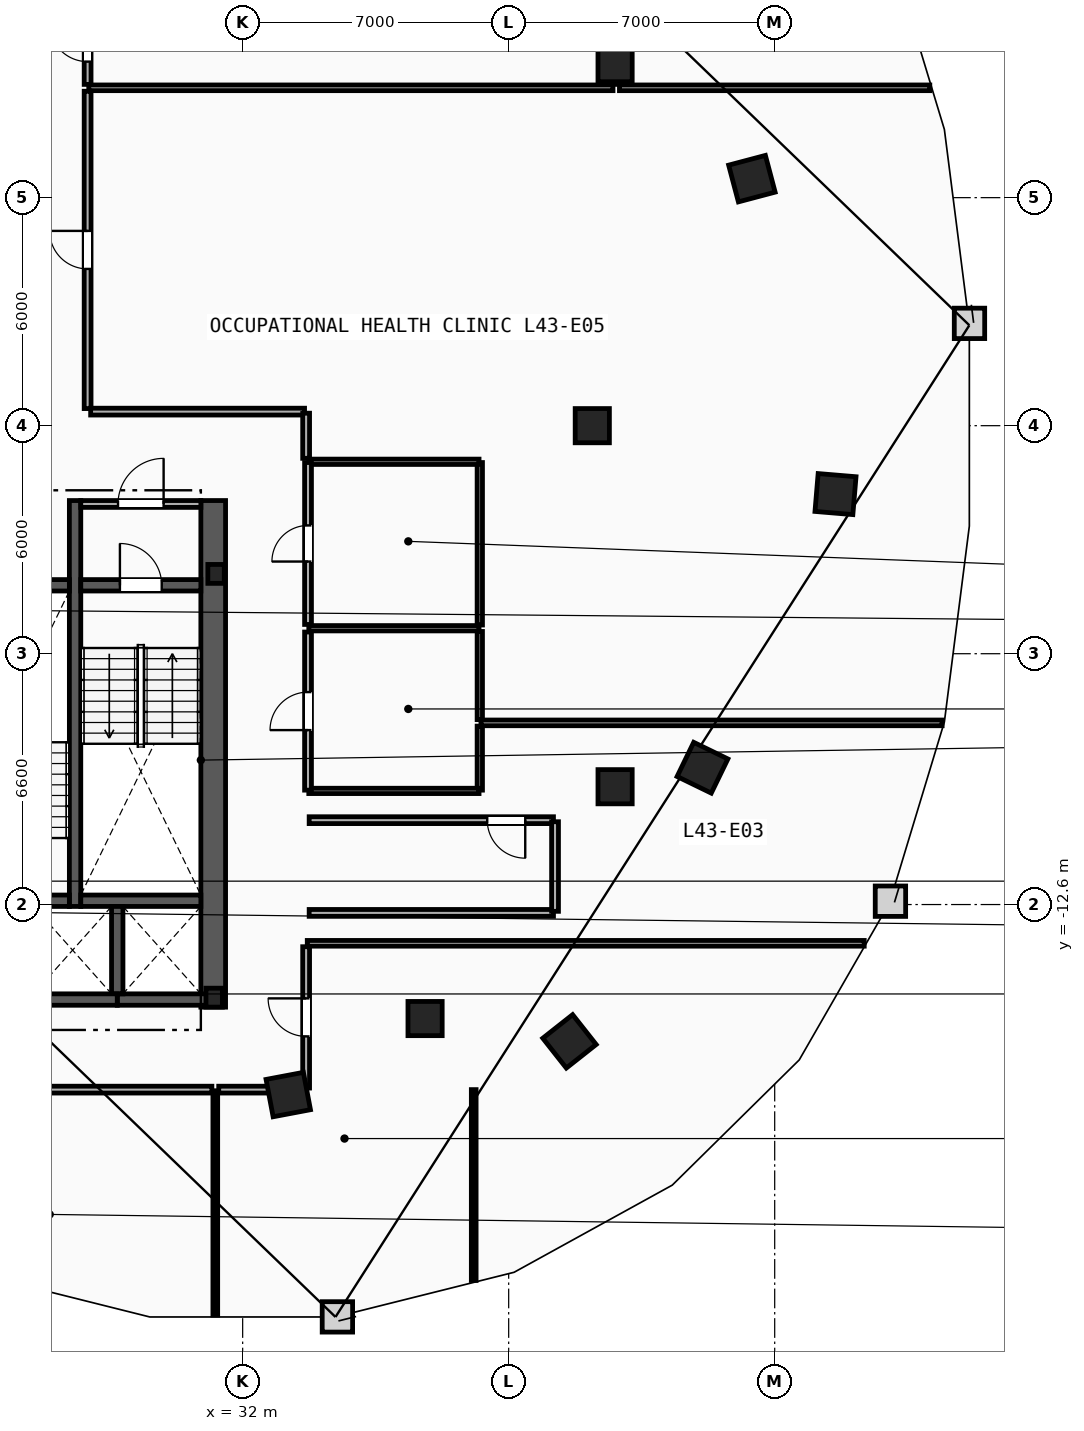
"""IFC4 building model, lengths in metres.
Left out: names, types, materials, properties, quantities, classifications, styles, units other than length and angle.
Written with IfcOpenShell. Run it as: python <this file> out.ifc"""

import sys

from ifc_helpers import new_model, si_unit, direction, frame, frame_2d, origin, origin_2d, place, context, subcontext, project, spatial, rectangle, i_section, extrude, element, fill, save


model = new_model("IFC4")
c1 = context("Model", 3, precision=1e-05, world=origin(), true_north=direction((0.0, 1.0)))
c2 = subcontext(c1, "Body", "Model", "MODEL_VIEW")
j1 = project(units=[si_unit("LENGTHUNIT", "METRE"), si_unit("PLANEANGLEUNIT", "RADIAN")], contexts=[c1])
p1 = place(None, origin())
s1 = spatial("IfcSite", under=j1, at=p1, CompositionType="ELEMENT")
p2 = place(p1, origin())
s2 = spatial("IfcBuilding", under=s1, at=p2, CompositionType="ELEMENT")
p3 = place(p2, frame((0.0, 0.0, 165.6)))
s3 = spatial("IfcBuildingStorey", under=s2, at=p3, CompositionType="ELEMENT", Elevation=165.6)
for number, where, z_axis, x_axis in (
    (1, (31.3, -3.9, 0.0), (0.0, 0.0, 1.0), (1.0, 0.0, 0.0)),
    (2, (31.25, -15.05, 0.0), (0.0, 0.0, 1.0), (1.0, 0.0, 0.0)),
):
    element("IfcColumn", number, at=place(p3, frame(where, z_axis=z_axis, x_axis=x_axis)), inside=s3, PredefinedType="COLUMN", context=c2, shape_type="SweptSolid", body=[
        extrude(i_section(OverallWidth=0.432, OverallDepth=0.498, WebThickness=0.056, FlangeThickness=0.089, FilletRadius=0.018, at=origin_2d()), origin(), (0.0, 0.0, 1.0), 3.6),
    ])
for number, where, z_axis, x_axis in (
    (3, (41.2, 0.0, 0.0), (0.0, 0.0, 1.0), (1.0, 0.0, 0.0)),
    (4, (41.8, -9.5, 0.0), (0.0, 0.0, 1.0), (1.0, 0.0, 0.0)),
    (5, (36.8, -15.6, 0.0), (0.0, 0.0, 1.0), (1.0, 0.0, 0.0)),
    (6, (41.8, 9.5, 0.0), (0.0, 0.0, 1.0), (1.0, 0.0, 0.0)),
):
    element("IfcColumn", number, at=place(p3, frame(where, z_axis=z_axis, x_axis=x_axis)), inside=s3, PredefinedType="COLUMN", context=c2, shape_type="SweptSolid", body=[
        extrude(rectangle(XDim=0.9, YDim=0.9, at=origin_2d()), origin(), (0.0, 0.0, 1.0), 3.6),
    ])
for number, where, z_axis, x_axis in (
    (7, (33.2, -17.6, 0.0), (0.0, 0.0, 1.0), (0.983, 0.186, 0.0)),
    (8, (40.6, -16.2, 0.0), (0.0, 0.0, 1.0), (0.785, 0.619, 0.0)),
    (9, (44.1, -9.0, 0.0), (0.0, 0.0, 1.0), (0.437, 0.899, 0.0)),
    (10, (47.6, -1.8, 0.0), (0.0, 0.0, 1.0), (0.084, 0.997, 0.0)),
    (11, (45.4, 6.5, 0.0), (0.0, 0.0, 1.0), (-0.256, 0.967, 0.0)),
):
    element("IfcColumn", number, at=place(p3, frame(where, z_axis=z_axis, x_axis=x_axis)), inside=s3, PredefinedType="COLUMN", context=c2, shape_type="SweptSolid", body=[
        extrude(rectangle(XDim=1.0, YDim=1.0, at=origin_2d()), origin(), (0.0, 0.0, 1.0), 3.6),
    ])
p4 = place(p3, frame((31.225, -15.3, 0.0), z_axis=(0.0, 0.0, 1.0), x_axis=(0.0, 1.0, 0.0)))
e12 = element("IfcWall", 12, at=p4, inside=s3, PredefinedType="SHEAR", context=c2, shape_type="SweptSolid", body=[
    extrude(rectangle(XDim=13.33, YDim=0.65, at=frame_2d((6.665, 0.0))), origin(), (0.0, 0.0, 1.0), 3.36),
])
p5 = place(p3, frame((27.59, -12.65, 0.0), z_axis=(0.0, 0.0, 1.0), x_axis=(0.0, 1.0, 0.0)))
e13 = element("IfcWall", 13, at=p5, inside=s3, PredefinedType="SHEAR", context=c2, shape_type="SweptSolid", body=[
    extrude(rectangle(XDim=10.68, YDim=0.3, at=frame_2d((5.34, 0.0))), origin(), (0.0, 0.0, 1.0), 3.36),
])
p6 = place(p3, frame((27.74, -4.2, 0.0), z_axis=(0.0, 0.0, 1.0), x_axis=(1.0, 0.0, 0.0)))
e14 = element("IfcWall", 14, at=p6, inside=s3, PredefinedType="SHEAR", context=c2, shape_type="SweptSolid", body=[
    extrude(rectangle(XDim=3.16, YDim=0.3, at=frame_2d((1.58, 0.0))), origin(), (0.0, 0.0, 1.0), 3.36),
])
p7 = place(p6, frame((1.03, 0.0, 0.0)))
e15 = element("IfcOpeningElement", 15, at=p7, cuts=e14, PredefinedType="OPENING", context=c2, shape_type="SweptSolid", body=[
    extrude(rectangle(XDim=1.1, YDim=2.15, at=frame_2d((0.55, 1.075))), frame((0.0, 0.16, 0.0), z_axis=(0.0, -1.0, 0.0), x_axis=(1.0, 0.0, 0.0)), (0.0, 0.0, 1.0), 0.32),
])
p8 = place(p3, frame((27.74, -12.5, 0.0), z_axis=(0.0, 0.0, 1.0), x_axis=(1.0, 0.0, 0.0)))
e16 = element("IfcWall", 16, at=p8, inside=s3, PredefinedType="SHEAR", context=c2, shape_type="SweptSolid", body=[
    extrude(rectangle(XDim=3.16, YDim=0.3, at=frame_2d((1.58, 0.0))), origin(), (0.0, 0.0, 1.0), 3.36),
])
p9 = place(p3, frame((24.28, -12.5, 0.0), z_axis=(0.0, 0.0, 1.0), x_axis=(1.0, 0.0, 0.0)))
e17 = element("IfcWall", 17, at=p9, inside=s3, PredefinedType="SHEAR", context=c2, shape_type="SweptSolid", body=[
    extrude(rectangle(XDim=3.16, YDim=0.3, at=frame_2d((1.58, 0.0))), origin(), (0.0, 0.0, 1.0), 3.36),
])
p10 = place(p9, frame((1.03, 0.0, 0.0)))
e18 = element("IfcOpeningElement", 18, at=p10, cuts=e17, PredefinedType="OPENING", context=c2, shape_type="SweptSolid", body=[
    extrude(rectangle(XDim=1.1, YDim=2.15, at=frame_2d((0.55, 1.075))), frame((0.0, 0.16, 0.0), z_axis=(0.0, -1.0, 0.0), x_axis=(1.0, 0.0, 0.0)), (0.0, 0.0, 1.0), 0.32),
])
p11 = place(p3, frame((24.28, -4.2, 0.0), z_axis=(0.0, 0.0, 1.0), x_axis=(1.0, 0.0, 0.0)))
e19 = element("IfcWall", 19, at=p11, inside=s3, PredefinedType="SHEAR", context=c2, shape_type="SweptSolid", body=[
    extrude(rectangle(XDim=3.16, YDim=0.3, at=frame_2d((1.58, 0.0))), origin(), (0.0, 0.0, 1.0), 3.36),
])
p12 = place(p3, frame((27.74, -2.06, 0.0), z_axis=(0.0, 0.0, 1.0), x_axis=(1.0, 0.0, 0.0)))
e20 = element("IfcWall", 20, at=p12, inside=s3, PredefinedType="PARTITIONING", context=c2, shape_type="SweptSolid", body=[
    extrude(rectangle(XDim=3.16, YDim=0.18, at=frame_2d((1.58, 0.0))), origin(), (0.0, 0.0, 1.0), 3.36),
])
p13 = place(p12, frame((0.98, 0.0, 0.0)))
e21 = element("IfcOpeningElement", 21, at=p13, cuts=e20, PredefinedType="OPENING", context=c2, shape_type="SweptSolid", body=[
    extrude(rectangle(XDim=1.2, YDim=2.15, at=frame_2d((0.6, 1.075))), frame((0.0, 0.1, 0.0), z_axis=(0.0, -1.0, 0.0), x_axis=(1.0, 0.0, 0.0)), (0.0, 0.0, 1.0), 0.2),
])
p14 = place(p3, frame((28.7, -15.1, 0.0), z_axis=(0.0, 0.0, 1.0), x_axis=(1.0, 0.0, 0.0)))
e22 = element("IfcWall", 22, at=p14, inside=s3, PredefinedType="SHEAR", context=c2, shape_type="SweptSolid", body=[
    extrude(rectangle(XDim=2.5, YDim=0.3, at=frame_2d((1.25, 0.0))), origin(), (0.0, 0.0, 1.0), 3.36),
])
p15 = place(p3, frame((28.7, -14.95, 0.0), z_axis=(0.0, 0.0, 1.0), x_axis=(0.0, 1.0, 0.0)))
e23 = element("IfcWall", 23, at=p15, inside=s3, PredefinedType="SHEAR", context=c2, shape_type="SweptSolid", body=[
    extrude(rectangle(XDim=2.3, YDim=0.3, at=frame_2d((1.15, 0.0))), origin(), (0.0, 0.0, 1.0), 3.36),
])
p16 = place(p3, frame((26.2, -15.1, 0.0), z_axis=(0.0, 0.0, 1.0), x_axis=(1.0, 0.0, 0.0)))
e24 = element("IfcWall", 24, at=p16, inside=s3, PredefinedType="SHEAR", context=c2, shape_type="SweptSolid", body=[
    extrude(rectangle(XDim=2.5, YDim=0.3, at=frame_2d((1.25, 0.0))), origin(), (0.0, 0.0, 1.0), 3.36),
])
p17 = place(p3, frame((38.24, -9.59, 0.0), z_axis=(0.0, 0.0, 1.0), x_axis=(0.0, 1.0, 0.0)))
e25 = element("IfcWall", 25, at=p17, inside=s3, PredefinedType="PARTITIONING", context=c2, shape_type="SweptSolid", body=[
    extrude(rectangle(XDim=1.685, YDim=0.14, at=frame_2d((0.843, 0.0))), origin(), (0.0, 0.0, 1.0), 3.36),
])
p18 = place(p3, frame((38.24, -7.735, 0.0), z_axis=(0.0, 0.0, 1.0), x_axis=(0.0, 1.0, 0.0)))
e26 = element("IfcWall", 26, at=p18, inside=s3, PredefinedType="PARTITIONING", context=c2, shape_type="SweptSolid", body=[
    extrude(rectangle(XDim=2.32, YDim=0.14, at=frame_2d((1.16, 0.0))), origin(), (0.0, 0.0, 1.0), 3.36),
])
p19 = place(p3, frame((38.24, -5.245, 0.0), z_axis=(0.0, 0.0, 1.0), x_axis=(0.0, 1.0, 0.0)))
e27 = element("IfcWall", 27, at=p19, inside=s3, PredefinedType="PARTITIONING", context=c2, shape_type="SweptSolid", body=[
    extrude(rectangle(XDim=4.275, YDim=0.14, at=frame_2d((2.138, 0.0))), origin(), (0.0, 0.0, 1.0), 3.36),
])
for number, where, z_axis, x_axis in (
    (28, (33.74, -0.95, 0.0), (0.0, 0.0, 1.0), (1.0, 0.0, 0.0)),
    (29, (33.74, -5.33, 0.0), (0.0, 0.0, 1.0), (1.0, 0.0, 0.0)),
    (30, (33.74, -9.61, 0.0), (0.0, 0.0, 1.0), (1.0, 0.0, 0.0)),
):
    element("IfcWall", number, at=place(p3, frame(where, z_axis=z_axis, x_axis=x_axis)), inside=s3, PredefinedType="PARTITIONING", context=c2, shape_type="SweptSolid", body=[
        extrude(rectangle(XDim=4.48, YDim=0.14, at=frame_2d((2.24, 0.0))), origin(), (0.0, 0.0, 1.0), 3.36),
    ])
p20 = place(p3, frame((33.72, -5.23, 0.0), z_axis=(0.0, 0.0, 1.0), x_axis=(0.0, 1.0, 0.0)))
e31 = element("IfcWall", 31, at=p20, inside=s3, PredefinedType="PARTITIONING", context=c2, shape_type="SweptSolid", body=[
    extrude(rectangle(XDim=4.26, YDim=0.18, at=frame_2d((2.13, 0.0))), origin(), (0.0, 0.0, 1.0), 3.36),
])
p21 = place(p20, frame((1.655, 0.0, 0.0)))
e32 = element("IfcOpeningElement", 32, at=p21, cuts=e31, PredefinedType="OPENING", context=c2, shape_type="SweptSolid", body=[
    extrude(rectangle(XDim=0.95, YDim=2.1, at=frame_2d((0.475, 1.05))), frame((0.0, 0.1, 0.0), z_axis=(0.0, -1.0, 0.0), x_axis=(1.0, 0.0, 0.0)), (0.0, 0.0, 1.0), 0.2),
])
p22 = place(p3, frame((33.72, -9.59, 0.0), z_axis=(0.0, 0.0, 1.0), x_axis=(0.0, 1.0, 0.0)))
e33 = element("IfcWall", 33, at=p22, inside=s3, PredefinedType="PARTITIONING", context=c2, shape_type="SweptSolid", body=[
    extrude(rectangle(XDim=4.16, YDim=0.18, at=frame_2d((2.08, 0.0))), origin(), (0.0, 0.0, 1.0), 3.36),
])
p23 = place(p22, frame((1.58, 0.0, 0.0)))
e34 = element("IfcOpeningElement", 34, at=p23, cuts=e33, PredefinedType="OPENING", context=c2, shape_type="SweptSolid", body=[
    extrude(rectangle(XDim=1.0, YDim=2.15, at=frame_2d((0.5, 1.075))), frame((0.0, 0.1, 0.0), z_axis=(0.0, -1.0, 0.0), x_axis=(1.0, 0.0, 0.0)), (0.0, 0.0, 1.0), 0.2),
])
p24 = place(p3, frame((27.95, 8.89, 0.0), z_axis=(0.0, 0.0, 1.0), x_axis=(1.0, 0.0, 0.0)))
e35 = element("IfcWall", 35, at=p24, inside=s3, PredefinedType="PARTITIONING", context=c2, shape_type="SweptSolid", body=[
    extrude(rectangle(XDim=13.795, YDim=0.15, at=frame_2d((6.897, 0.0))), origin(), (0.0, 0.0, 1.0), 3.36),
])
p25 = place(p3, frame((41.915, 8.89, 0.0), z_axis=(0.0, 0.0, 1.0), x_axis=(1.0, 0.0, 0.0)))
e36 = element("IfcWall", 36, at=p25, inside=s3, PredefinedType="PARTITIONING", context=c2, shape_type="SweptSolid", body=[
    extrude(rectangle(XDim=8.167, YDim=0.15, at=frame_2d((4.083, 0.0))), origin(), (0.0, 0.0, 1.0), 3.36),
])
p26 = place(p3, frame((38.27, -7.82, 0.0), z_axis=(0.0, 0.0, 1.0), x_axis=(1.0, 0.0, 0.0)))
e37 = element("IfcWall", 37, at=p26, inside=s3, PredefinedType="PARTITIONING", context=c2, shape_type="SweptSolid", body=[
    extrude(rectangle(XDim=12.136, YDim=0.15, at=frame_2d((6.068, 0.0))), origin(), (0.0, 0.0, 1.0), 3.36),
])
p27 = place(p3, frame((33.7, -13.62, 0.0), z_axis=(0.0, 0.0, 1.0), x_axis=(1.0, 0.0, 0.0)))
e38 = element("IfcWall", 38, at=p27, inside=s3, PredefinedType="PARTITIONING", context=c2, shape_type="SweptSolid", body=[
    extrude(rectangle(XDim=14.656, YDim=0.15, at=frame_2d((7.328, 0.0))), origin(), (0.0, 0.0, 1.0), 3.36),
])
p28 = place(p3, frame((31.28, -23.402, 0.0), z_axis=(0.0, 0.0, 1.0), x_axis=(0.0, 1.0, 0.0)))
e39 = element("IfcWall", 39, at=p28, inside=s3, PredefinedType="PARTITIONING", context=c2, shape_type="SweptSolid", body=[
    extrude(rectangle(XDim=5.902, YDim=0.125, at=frame_2d((2.951, 0.0))), origin(), (0.0, 0.0, 1.0), 3.36),
])
p29 = place(p3, frame((38.08, -22.491, 0.0), z_axis=(0.0, 0.0, 1.0), x_axis=(0.0, 1.0, 0.0)))
e40 = element("IfcWall", 40, at=p29, inside=s3, PredefinedType="PARTITIONING", context=c2, shape_type="SweptSolid", body=[
    extrude(rectangle(XDim=5.021, YDim=0.125, at=frame_2d((2.511, 0.0))), origin(), (0.0, 0.0, 1.0), 3.36),
])
p30 = place(p3, frame((18.342, -17.47, 0.0), z_axis=(0.0, 0.0, 1.0), x_axis=(1.0, 0.0, 0.0)))
e41 = element("IfcWall", 41, at=p30, inside=s3, PredefinedType="PARTITIONING", context=c2, shape_type="SweptSolid", body=[
    extrude(rectangle(XDim=12.848, YDim=0.18, at=frame_2d((6.424, 0.0))), origin(), (0.0, 0.0, 1.0), 3.36),
])
p31 = place(p30, frame((4.183, 0.0, 0.0)))
e42 = element("IfcOpeningElement", 42, at=p31, cuts=e41, PredefinedType="OPENING", context=c2, shape_type="SweptSolid", body=[
    extrude(rectangle(XDim=1.0, YDim=2.15, at=frame_2d((0.5, 1.075))), frame((0.0, 0.1, 0.0), z_axis=(0.0, -1.0, 0.0), x_axis=(1.0, 0.0, 0.0)), (0.0, 0.0, 1.0), 0.2),
])
p32 = place(p3, frame((33.67, -17.428, 0.0), z_axis=(0.0, 0.0, 1.0), x_axis=(0.0, 1.0, 0.0)))
e43 = element("IfcWall", 43, at=p32, inside=s3, PredefinedType="PARTITIONING", context=c2, shape_type="SweptSolid", body=[
    extrude(rectangle(XDim=3.719, YDim=0.18, at=frame_2d((1.859, 0.0))), origin(), (0.0, 0.0, 1.0), 3.36),
])
p33 = place(p32, frame((1.359, 0.0, 0.0)))
e44 = element("IfcOpeningElement", 44, at=p33, cuts=e43, PredefinedType="OPENING", context=c2, shape_type="SweptSolid", body=[
    extrude(rectangle(XDim=1.0, YDim=2.15, at=frame_2d((0.5, 1.075))), frame((0.0, 0.1, 0.0), z_axis=(0.0, -1.0, 0.0), x_axis=(1.0, 0.0, 0.0)), (0.0, 0.0, 1.0), 0.2),
])
p34 = place(p3, frame((31.37, -17.47, 0.0), z_axis=(0.0, 0.0, 1.0), x_axis=(1.0, 0.0, 0.0)))
e45 = element("IfcWall", 45, at=p34, inside=s3, PredefinedType="PARTITIONING", context=c2, shape_type="SweptSolid", body=[
    extrude(rectangle(XDim=2.258, YDim=0.18, at=frame_2d((1.129, 0.0))), origin(), (0.0, 0.0, 1.0), 3.36),
])
p35 = place(p3, frame((33.75, -12.82, 0.0), z_axis=(0.0, 0.0, 1.0), x_axis=(1.0, 0.0, 0.0)))
e46 = element("IfcWall", 46, at=p35, inside=s3, PredefinedType="PARTITIONING", context=c2, shape_type="SweptSolid", body=[
    extrude(rectangle(XDim=6.428, YDim=0.18, at=frame_2d((3.214, 0.0))), origin(), (0.0, 0.0, 1.0), 3.36),
])
p36 = place(p3, frame((40.178, -10.38, 0.0), z_axis=(0.0, 0.0, 1.0), x_axis=(-1.0, 0.0, 0.0)))
e47 = element("IfcWall", 47, at=p36, inside=s3, PredefinedType="PARTITIONING", context=c2, shape_type="SweptSolid", body=[
    extrude(rectangle(XDim=6.428, YDim=0.18, at=frame_2d((3.214, 0.0))), origin(), (0.0, 0.0, 1.0), 3.36),
])
p37 = place(p36, frame((0.743, 0.0, 0.0)))
e48 = element("IfcOpeningElement", 48, at=p37, cuts=e47, PredefinedType="OPENING", context=c2, shape_type="SweptSolid", body=[
    extrude(rectangle(XDim=1.0, YDim=2.15, at=frame_2d((0.5, 1.075))), frame((0.0, 0.1, 0.0), z_axis=(0.0, -1.0, 0.0), x_axis=(1.0, 0.0, 0.0)), (0.0, 0.0, 1.0), 0.2),
])
p38 = place(p3, frame((40.22, -12.779, 0.0), z_axis=(0.0, 0.0, 1.0), x_axis=(0.0, 1.0, 0.0)))
e49 = element("IfcWall", 49, at=p38, inside=s3, PredefinedType="PARTITIONING", context=c2, shape_type="SweptSolid", body=[
    extrude(rectangle(XDim=2.357, YDim=0.18, at=frame_2d((1.179, 0.0))), origin(), (0.0, 0.0, 1.0), 3.36),
])
p39 = place(p3, frame((27.92, 0.45, 0.0), z_axis=(0.0, 0.0, 1.0), x_axis=(0.0, 1.0, 0.0)))
e50 = element("IfcWall", 50, at=p39, inside=s3, PredefinedType="PARTITIONING", context=c2, shape_type="SweptSolid", body=[
    extrude(rectangle(XDim=8.35, YDim=0.18, at=frame_2d((4.175, 0.0))), origin(), (0.0, 0.0, 1.0), 3.36),
])
p40 = place(p39, frame((3.675, 0.0, 0.0)))
e51 = element("IfcOpeningElement", 51, at=p40, cuts=e50, PredefinedType="OPENING", context=c2, shape_type="SweptSolid", body=[
    extrude(rectangle(XDim=1.0, YDim=2.15, at=frame_2d((0.5, 1.075))), frame((0.0, 0.1, 0.0), z_axis=(0.0, -1.0, 0.0), x_axis=(1.0, 0.0, 0.0)), (0.0, 0.0, 1.0), 0.2),
])
p41 = place(p3, frame((33.628, 0.37, 0.0), z_axis=(0.0, 0.0, 1.0), x_axis=(-1.0, 0.0, 0.0)))
e52 = element("IfcWall", 52, at=p41, inside=s3, PredefinedType="PARTITIONING", context=c2, shape_type="SweptSolid", body=[
    extrude(rectangle(XDim=5.628, YDim=0.18, at=frame_2d((2.814, 0.0))), origin(), (0.0, 0.0, 1.0), 3.36),
])
p42 = place(p3, frame((33.67, -0.859, 0.0), z_axis=(0.0, 0.0, 1.0), x_axis=(0.0, 1.0, 0.0)))
e53 = element("IfcWall", 53, at=p42, inside=s3, PredefinedType="PARTITIONING", context=c2, shape_type="SweptSolid", body=[
    extrude(rectangle(XDim=1.187, YDim=0.18, at=frame_2d((0.594, 0.0))), origin(), (0.0, 0.0, 1.0), 3.36),
])
p43 = place(p3, frame((27.92, 8.98, 0.0), z_axis=(0.0, 0.0, 1.0), x_axis=(0.0, 1.0, 0.0)))
e54 = element("IfcWall", 54, at=p43, inside=s3, PredefinedType="PARTITIONING", context=c2, shape_type="SweptSolid", body=[
    extrude(rectangle(XDim=2.198, YDim=0.18, at=frame_2d((1.099, 0.0))), origin(), (0.0, 0.0, 1.0), 3.36),
])
p44 = place(p43, frame((0.599, 0.0, 0.0)))
e55 = element("IfcOpeningElement", 55, at=p44, cuts=e54, PredefinedType="OPENING", context=c2, shape_type="SweptSolid", body=[
    extrude(rectangle(XDim=1.0, YDim=2.15, at=frame_2d((0.5, 1.075))), frame((0.0, 0.1, 0.0), z_axis=(0.0, -1.0, 0.0), x_axis=(1.0, 0.0, 0.0)), (0.0, 0.0, 1.0), 0.2),
])
p45 = place(p3, frame((41.83, 8.98, 0.0), z_axis=(0.0, 0.0, 1.0), x_axis=(0.0, 1.0, 0.0)))
e56 = element("IfcWall", 56, at=p45, inside=s3, PredefinedType="PARTITIONING", context=c2, shape_type="SweptSolid", body=[
    extrude(rectangle(XDim=11.638, YDim=0.125, at=frame_2d((5.819, 0.0))), origin(), (0.0, 0.0, 1.0), 2.897),
])
p46 = place(p45, frame((3.76, 0.0, 0.0)))
e57 = element("IfcOpeningElement", 57, at=p46, cuts=e56, PredefinedType="OPENING", context=c2, shape_type="SweptSolid", body=[
    extrude(rectangle(XDim=1.0, YDim=2.15, at=frame_2d((0.5, 1.075))), frame((0.0, 0.073, 0.0), z_axis=(0.0, -1.0, 0.0), x_axis=(1.0, 0.0, 0.0)), (0.0, 0.0, 1.0), 0.145),
])
p47 = place(p7, origin())
e58 = element("IfcDoor", 58, at=p47, inside=s3, OperationType="SINGLE_SWING_LEFT", PredefinedType="DOOR", context=c2, shape_type="SweptSolid", body=[
    extrude(rectangle(XDim=1.1, YDim=2.15, at=frame_2d((0.55, 1.075))), frame((0.0, 0.025, 0.0), z_axis=(0.0, -1.0, 0.0), x_axis=(1.0, 0.0, 0.0)), (0.0, 0.0, 1.0), 0.05),
])
fill(e15, e58)
p48 = place(p13, origin())
e59 = element("IfcDoor", 59, at=p48, inside=s3, OperationType="SINGLE_SWING_RIGHT", PredefinedType="DOOR", context=c2, shape_type="SweptSolid", body=[
    extrude(rectangle(XDim=1.2, YDim=2.15, at=frame_2d((0.6, 1.075))), frame((0.0, 0.025, 0.0), z_axis=(0.0, -1.0, 0.0), x_axis=(1.0, 0.0, 0.0)), (0.0, 0.0, 1.0), 0.05),
])
fill(e21, e59)
p49 = place(p40, origin())
e60 = element("IfcDoor", 60, at=p49, inside=s3, OperationType="SINGLE_SWING_RIGHT", PredefinedType="DOOR", context=c2, shape_type="SweptSolid", body=[
    extrude(rectangle(XDim=1.0, YDim=2.15, at=frame_2d((0.5, 1.075))), frame((0.0, 0.025, 0.0), z_axis=(0.0, -1.0, 0.0), x_axis=(1.0, 0.0, 0.0)), (0.0, 0.0, 1.0), 0.05),
])
fill(e51, e60)
p50 = place(p21, origin())
e61 = element("IfcDoor", 61, at=p50, inside=s3, OperationType="SINGLE_SWING_LEFT", PredefinedType="DOOR", context=c2, shape_type="SweptSolid", body=[
    extrude(rectangle(XDim=0.95, YDim=2.1, at=frame_2d((0.475, 1.05))), frame((0.0, 0.025, 0.0), z_axis=(0.0, -1.0, 0.0), x_axis=(1.0, 0.0, 0.0)), (0.0, 0.0, 1.0), 0.05),
])
fill(e32, e61)
p51 = place(p23, origin())
e62 = element("IfcDoor", 62, at=p51, inside=s3, OperationType="SINGLE_SWING_LEFT", PredefinedType="DOOR", context=c2, shape_type="SweptSolid", body=[
    extrude(rectangle(XDim=1.0, YDim=2.15, at=frame_2d((0.5, 1.075))), frame((0.0, 0.025, 0.0), z_axis=(0.0, -1.0, 0.0), x_axis=(1.0, 0.0, 0.0)), (0.0, 0.0, 1.0), 0.05),
])
fill(e34, e62)
p52 = place(p33, origin())
e63 = element("IfcDoor", 63, at=p52, inside=s3, OperationType="SINGLE_SWING_RIGHT", PredefinedType="DOOR", context=c2, shape_type="SweptSolid", body=[
    extrude(rectangle(XDim=1.0, YDim=2.15, at=frame_2d((0.5, 1.075))), frame((0.0, 0.025, 0.0), z_axis=(0.0, -1.0, 0.0), x_axis=(1.0, 0.0, 0.0)), (0.0, 0.0, 1.0), 0.05),
])
fill(e44, e63)
p53 = place(p44, origin())
e64 = element("IfcDoor", 64, at=p53, inside=s3, OperationType="SINGLE_SWING_RIGHT", PredefinedType="DOOR", context=c2, shape_type="SweptSolid", body=[
    extrude(rectangle(XDim=1.0, YDim=2.15, at=frame_2d((0.5, 1.075))), frame((0.0, 0.025, 0.0), z_axis=(0.0, -1.0, 0.0), x_axis=(1.0, 0.0, 0.0)), (0.0, 0.0, 1.0), 0.05),
])
fill(e55, e64)
p54 = place(p37, origin())
e65 = element("IfcDoor", 65, at=p54, inside=s3, OperationType="SINGLE_SWING_LEFT", PredefinedType="DOOR", context=c2, shape_type="SweptSolid", body=[
    extrude(rectangle(XDim=1.0, YDim=2.15, at=frame_2d((0.5, 1.075))), frame((0.0, 0.025, 0.0), z_axis=(0.0, -1.0, 0.0), x_axis=(1.0, 0.0, 0.0)), (0.0, 0.0, 1.0), 0.05),
])
fill(e48, e65)
save(model, sys.argv[1])
